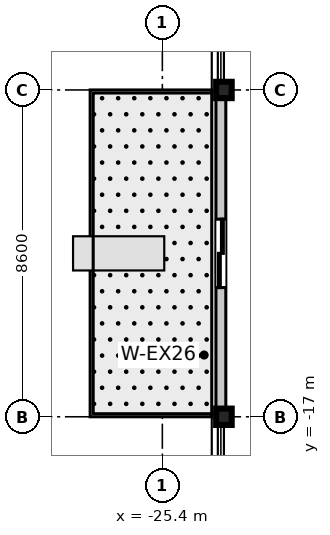
"""IFC4 building model, lengths in metres.
Left out: names, types, materials, properties, quantities, classifications, styles, units other than length and angle.
Written with IfcOpenShell. Run it as: python <this file> out.ifc"""

import sys

from ifc_helpers import new_model, si_unit, direction, frame, frame_2d, origin, origin_2d, place, context, subcontext, project, spatial, rectangle, i_section, extrude, source, transform, mapped, element, fill, save


model = new_model("IFC4")
c1 = context("Model", 3, precision=1e-05, world=origin(), true_north=direction((0.0, 1.0)))
c2 = subcontext(c1, "Body", "Model", "MODEL_VIEW")
j1 = project(units=[si_unit("LENGTHUNIT", "METRE"), si_unit("PLANEANGLEUNIT", "RADIAN")], contexts=[c1])
p1 = place(None, origin())
s1 = spatial("IfcSite", under=j1, at=p1, CompositionType="ELEMENT")
p2 = place(p1, origin())
s2 = spatial("IfcBuilding", under=s1, at=p2, CompositionType="ELEMENT")
p3 = place(p2, frame((0.0, 0.0, 95.6)))
s3 = spatial("IfcBuildingStorey", under=s2, at=p3, CompositionType="ELEMENT", Elevation=95.6)
m1 = source(origin(), c2, "Body", "SweptSolid", [
    extrude(i_section(OverallWidth=0.409, OverallDepth=0.43, WebThickness=0.021, FlangeThickness=0.034, at=origin_2d()), origin(), (0.0, 0.0, 1.0), 3.605),
])
for number, where, z_axis, x_axis in (
    (1, (-23.78, -17.0, 0.0), (0.0, 0.0, 1.0), (1.0, 0.0, 0.0)),
    (2, (-23.78, -8.4, 0.0), (0.0, 0.0, 1.0), (1.0, 0.0, 0.0)),
):
    element("IfcColumn", number, at=place(p3, frame(where, z_axis=z_axis, x_axis=x_axis)), inside=s3, PredefinedType="COLUMN", context=c2, shape_type="MappedRepresentation", body=[
        mapped(m1, transform((0.0, 0.0, 0.0), scale=1.0)),
    ])
m2 = source(origin(), c2, "Body", "SweptSolid", [
    extrude(rectangle(XDim=8.6, YDim=0.26, at=frame_2d((4.3, 0.0))), origin(), (0.0, 0.0, 1.0), 2.86),
])
p4 = place(p3, frame((-23.86, -17.0, 0.0), z_axis=(0.0, 0.0, 1.0), x_axis=(0.0, 1.0, 0.0)))
e3 = element("IfcWall", 3, at=p4, inside=s3, PredefinedType="STANDARD", context=c2, shape_type="MappedRepresentation", body=[
    mapped(m2, transform((0.0, 0.0, 0.0), scale=1.0)),
])
p5 = place(p4, frame((3.4, 0.0, 0.0)))
e4 = element("IfcOpeningElement", 4, at=p5, cuts=e3, PredefinedType="OPENING", context=c2, shape_type="SweptSolid", body=[
    extrude(rectangle(XDim=1.8, YDim=2.25, at=frame_2d((0.9, 1.125))), frame((0.0, 0.14, 0.0), z_axis=(0.0, -1.0, 0.0), x_axis=(1.0, 0.0, 0.0)), (0.0, 0.0, 1.0), 0.28),
])
m3 = source(origin(), c2, "Body", "SweptSolid", [
    extrude(rectangle(XDim=1.8, YDim=2.25, at=frame_2d((0.9, 1.125))), frame((0.0, 0.025, 0.0), z_axis=(0.0, -1.0, 0.0), x_axis=(1.0, 0.0, 0.0)), (0.0, 0.0, 1.0), 0.05),
])
p6 = place(p5, origin())
e5 = element("IfcDoor", 5, at=p6, inside=s3, OperationType="DOUBLE_DOOR_SLIDING", PredefinedType="DOOR", context=c2, shape_type="MappedRepresentation", body=[
    mapped(m3, transform((0.0, 0.0, 0.0), scale=1.0)),
])
fill(e4, e5)
save(model, sys.argv[1])
